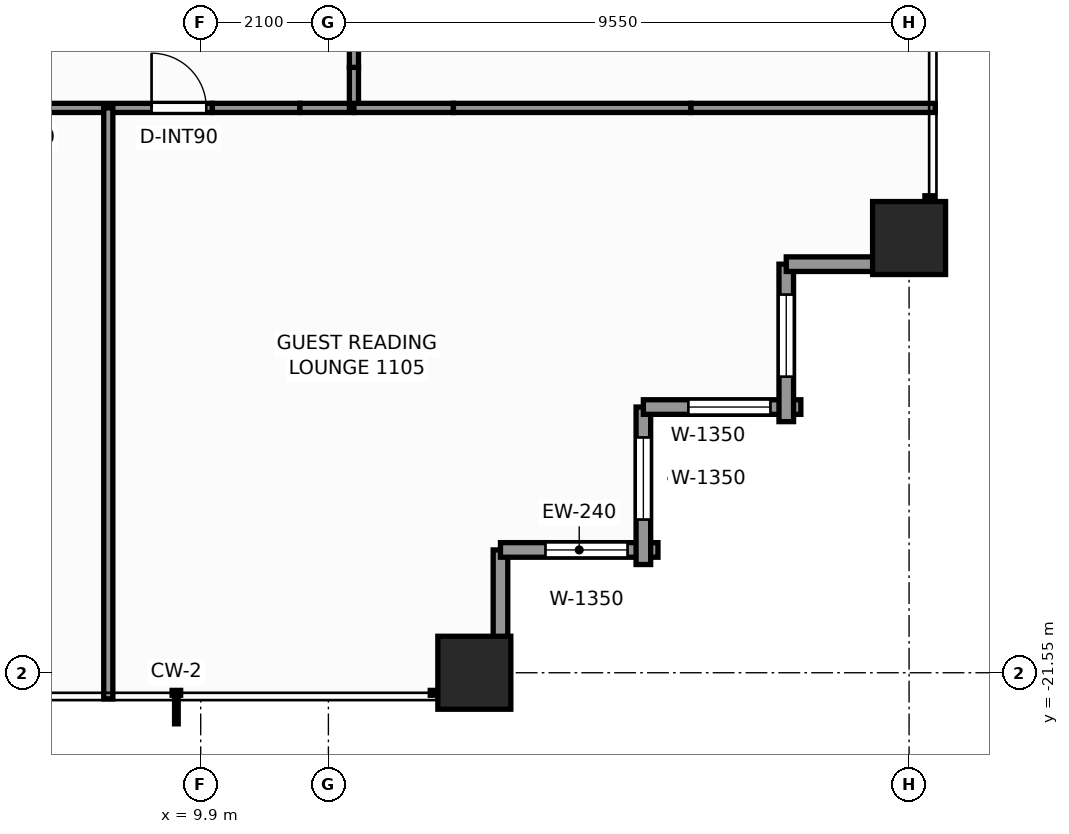
"""IFC4 building model, lengths in metres.
Left out: names, types, materials, properties, quantities, classifications, styles, units other than length and angle.
Written with IfcOpenShell. Run it as: python <this file> out.ifc"""

import sys

from ifc_helpers import new_model, si_unit, direction, frame, frame_2d, origin, origin_2d, place, context, subcontext, project, spatial, rectangle, extrude, element, fill, save


model = new_model("IFC4")
c1 = context("Model", 3, precision=1e-05, world=origin(), true_north=direction((0.0, 1.0)))
c2 = subcontext(c1, "Body", "Model", "MODEL_VIEW")
j1 = project(units=[si_unit("LENGTHUNIT", "METRE"), si_unit("PLANEANGLEUNIT", "RADIAN")], contexts=[c1])
p1 = place(None, origin())
s1 = spatial("IfcSite", under=j1, at=p1, CompositionType="ELEMENT")
p2 = place(p1, origin())
s2 = spatial("IfcBuilding", under=s1, at=p2, CompositionType="ELEMENT")
p3 = place(p2, frame((0.0, 0.0, 40.3)))
s3 = spatial("IfcBuildingStorey", under=s2, at=p3, CompositionType="ELEMENT", Elevation=40.3)
for number, where, z_axis, x_axis in (
    (1, (14.4, -21.55, 0.0), (0.0, 0.0, 1.0), (1.0, 0.0, 0.0)),
    (2, (21.55, -14.4, 0.0), (0.0, 0.0, 1.0), (1.0, 0.0, 0.0)),
):
    element("IfcColumn", number, at=place(p3, frame(where, z_axis=z_axis, x_axis=x_axis)), inside=s3, PredefinedType="COLUMN", context=c2, shape_type="SweptSolid", body=[
        extrude(rectangle(XDim=1.2, YDim=1.2, at=origin_2d()), origin(), (0.0, 0.0, 1.0), 3.3),
    ])
p4 = place(p3, frame((14.83, -19.53, 0.0), z_axis=(0.0, 0.0, 1.0), x_axis=(0.0, -1.0, 0.0)))
e3 = element("IfcWall", 3, at=p4, inside=s3, PredefinedType="STANDARD", context=c2, shape_type="SweptSolid", body=[
    extrude(rectangle(XDim=2.59, YDim=0.24, at=frame_2d((1.295, 0.0))), origin(), (0.0, 0.0, 1.0), 1.255),
])
p5 = place(p3, frame((17.42, -19.53, 0.0), z_axis=(0.0, 0.0, 1.0), x_axis=(-1.0, 0.0, 0.0)))
e4 = element("IfcWall", 4, at=p5, inside=s3, PredefinedType="STANDARD", context=c2, shape_type="SweptSolid", body=[
    extrude(rectangle(XDim=2.59, YDim=0.24, at=frame_2d((1.295, 0.0))), origin(), (0.0, 0.0, 1.0), 2.439),
])
p6 = place(p5, frame((0.5, 0.0, 0.65)))
e5 = element("IfcOpeningElement", 5, at=p6, cuts=e4, PredefinedType="OPENING", context=c2, shape_type="SweptSolid", body=[
    extrude(rectangle(XDim=1.35, YDim=1.55, at=frame_2d((0.675, 0.775))), frame((0.0, 0.13, 0.0), z_axis=(0.0, -1.0, 0.0), x_axis=(1.0, 0.0, 0.0)), (0.0, 0.0, 1.0), 0.26),
])
p7 = place(p3, frame((17.18, -17.18, 0.0), z_axis=(0.0, 0.0, 1.0), x_axis=(0.0, -1.0, 0.0)))
e6 = element("IfcWall", 6, at=p7, inside=s3, PredefinedType="STANDARD", context=c2, shape_type="SweptSolid", body=[
    extrude(rectangle(XDim=2.59, YDim=0.24, at=frame_2d((1.295, 0.0))), origin(), (0.0, 0.0, 1.0), 2.439),
])
p8 = place(p7, frame((0.5, 0.0, 0.65)))
e7 = element("IfcOpeningElement", 7, at=p8, cuts=e6, PredefinedType="OPENING", context=c2, shape_type="SweptSolid", body=[
    extrude(rectangle(XDim=1.35, YDim=1.55, at=frame_2d((0.675, 0.775))), frame((0.0, 0.13, 0.0), z_axis=(0.0, -1.0, 0.0), x_axis=(1.0, 0.0, 0.0)), (0.0, 0.0, 1.0), 0.26),
])
p9 = place(p3, frame((19.77, -17.18, 0.0), z_axis=(0.0, 0.0, 1.0), x_axis=(-1.0, 0.0, 0.0)))
e8 = element("IfcWall", 8, at=p9, inside=s3, PredefinedType="STANDARD", context=c2, shape_type="SweptSolid", body=[
    extrude(rectangle(XDim=2.59, YDim=0.24, at=frame_2d((1.295, 0.0))), origin(), (0.0, 0.0, 1.0), 2.439),
])
p10 = place(p9, frame((0.5, 0.0, 0.65)))
e9 = element("IfcOpeningElement", 9, at=p10, cuts=e8, PredefinedType="OPENING", context=c2, shape_type="SweptSolid", body=[
    extrude(rectangle(XDim=1.35, YDim=1.55, at=frame_2d((0.675, 0.775))), frame((0.0, 0.13, 0.0), z_axis=(0.0, -1.0, 0.0), x_axis=(1.0, 0.0, 0.0)), (0.0, 0.0, 1.0), 0.26),
])
p11 = place(p3, frame((19.53, -14.83, 0.0), z_axis=(0.0, 0.0, 1.0), x_axis=(0.0, -1.0, 0.0)))
e10 = element("IfcWall", 10, at=p11, inside=s3, PredefinedType="STANDARD", context=c2, shape_type="SweptSolid", body=[
    extrude(rectangle(XDim=2.59, YDim=0.24, at=frame_2d((1.295, 0.0))), origin(), (0.0, 0.0, 1.0), 2.439),
])
p12 = place(p11, frame((0.5, 0.0, 0.65)))
e11 = element("IfcOpeningElement", 11, at=p12, cuts=e10, PredefinedType="OPENING", context=c2, shape_type="SweptSolid", body=[
    extrude(rectangle(XDim=1.35, YDim=1.55, at=frame_2d((0.675, 0.775))), frame((0.0, 0.13, 0.0), z_axis=(0.0, -1.0, 0.0), x_axis=(1.0, 0.0, 0.0)), (0.0, 0.0, 1.0), 0.26),
])
p13 = place(p3, frame((22.12, -14.83, 0.0), z_axis=(0.0, 0.0, 1.0), x_axis=(-1.0, 0.0, 0.0)))
e12 = element("IfcWall", 12, at=p13, inside=s3, PredefinedType="STANDARD", context=c2, shape_type="SweptSolid", body=[
    extrude(rectangle(XDim=2.59, YDim=0.24, at=frame_2d((1.295, 0.0))), origin(), (0.0, 0.0, 1.0), 1.255),
])
p14 = place(p3, frame((5.242, -12.26, 0.0), z_axis=(0.0, 0.0, 1.0), x_axis=(1.0, 0.0, 0.0)))
e13 = element("IfcWall", 13, at=p14, inside=s3, PredefinedType="PARTITIONING", context=c2, shape_type="SweptSolid", body=[
    extrude(rectangle(XDim=4.85, YDim=0.15, at=frame_2d((2.425, 0.0))), origin(), (0.0, 0.0, 1.0), 3.06),
])
p15 = place(p14, frame((1.165, 0.0, 0.0)))
e14 = element("IfcOpeningElement", 14, at=p15, cuts=e13, PredefinedType="OPENING", context=c2, shape_type="SweptSolid", body=[
    extrude(rectangle(XDim=0.9, YDim=2.06, at=frame_2d((0.45, 1.03))), frame((0.0, 0.085, 0.0), z_axis=(0.0, -1.0, 0.0), x_axis=(1.0, 0.0, 0.0)), (0.0, 0.0, 1.0), 0.17),
])
p16 = place(p14, frame((3.85, 0.0, 0.0)))
e15 = element("IfcOpeningElement", 15, at=p16, cuts=e13, PredefinedType="OPENING", context=c2, shape_type="SweptSolid", body=[
    extrude(rectangle(XDim=0.9, YDim=2.06, at=frame_2d((0.45, 1.03))), frame((0.0, 0.085, 0.0), z_axis=(0.0, -1.0, 0.0), x_axis=(1.0, 0.0, 0.0)), (0.0, 0.0, 1.0), 0.17),
])
p17 = place(p3, frame((10.092, -12.26, 0.0), z_axis=(0.0, 0.0, 1.0), x_axis=(1.0, 0.0, 0.0)))
e16 = element("IfcWall", 16, at=p17, inside=s3, PredefinedType="PARTITIONING", context=c2, shape_type="SweptSolid", body=[
    extrude(rectangle(XDim=1.439, YDim=0.15, at=frame_2d((0.72, 0.0))), origin(), (0.0, 0.0, 1.0), 1.245),
])
p18 = place(p3, frame((11.531, -12.26, 0.0), z_axis=(0.0, 0.0, 1.0), x_axis=(1.0, 0.0, 0.0)))
e17 = element("IfcWall", 17, at=p18, inside=s3, PredefinedType="PARTITIONING", context=c2, shape_type="SweptSolid", body=[
    extrude(rectangle(XDim=0.889, YDim=0.15, at=frame_2d((0.444, 0.0))), origin(), (0.0, 0.0, 1.0), 3.06),
])
p19 = place(p3, frame((12.42, -12.26, 0.0), z_axis=(0.0, 0.0, 1.0), x_axis=(0.0, 1.0, 0.0)))
e18 = element("IfcWall", 18, at=p19, inside=s3, PredefinedType="PARTITIONING", context=c2, shape_type="SweptSolid", body=[
    extrude(rectangle(XDim=0.667, YDim=0.15, at=frame_2d((0.333, 0.0))), origin(), (0.0, 0.0, 1.0), 3.06),
])
p20 = place(p3, frame((12.42, -11.593, 0.0), z_axis=(0.0, 0.0, 1.0), x_axis=(0.0, 1.0, 0.0)))
e19 = element("IfcWall", 19, at=p20, inside=s3, PredefinedType="PARTITIONING", context=c2, shape_type="SweptSolid", body=[
    extrude(rectangle(XDim=1.439, YDim=0.15, at=frame_2d((0.72, 0.0))), origin(), (0.0, 0.0, 1.0), 1.245),
])
p21 = place(p3, frame((12.42, -12.26, 0.0), z_axis=(0.0, 0.0, 1.0), x_axis=(1.0, 0.0, 0.0)))
e20 = element("IfcWall", 20, at=p21, inside=s3, PredefinedType="PARTITIONING", context=c2, shape_type="SweptSolid", body=[
    extrude(rectangle(XDim=1.636, YDim=0.15, at=frame_2d((0.818, 0.0))), origin(), (0.0, 0.0, 1.0), 3.06),
])
p22 = place(p3, frame((14.056, -12.26, 0.0), z_axis=(0.0, 0.0, 1.0), x_axis=(1.0, 0.0, 0.0)))
e21 = element("IfcWall", 21, at=p22, inside=s3, PredefinedType="PARTITIONING", context=c2, shape_type="SweptSolid", body=[
    extrude(rectangle(XDim=3.907, YDim=0.15, at=frame_2d((1.954, 0.0))), origin(), (0.0, 0.0, 1.0), 1.245),
])
p23 = place(p3, frame((17.963, -12.26, 0.0), z_axis=(0.0, 0.0, 1.0), x_axis=(1.0, 0.0, 0.0)))
e22 = element("IfcWall", 22, at=p23, inside=s3, PredefinedType="PARTITIONING", context=c2, shape_type="SweptSolid", body=[
    extrude(rectangle(XDim=4.017, YDim=0.15, at=frame_2d((2.008, 0.0))), origin(), (0.0, 0.0, 1.0), 2.429),
])
p24 = place(p3, frame((8.38, -21.98, 0.0), z_axis=(0.0, 0.0, 1.0), x_axis=(0.0, 1.0, 0.0)))
e23 = element("IfcWall", 23, at=p24, inside=s3, PredefinedType="PARTITIONING", context=c2, shape_type="SweptSolid", body=[
    extrude(rectangle(XDim=9.72, YDim=0.15, at=frame_2d((4.86, 0.0))), origin(), (0.0, 0.0, 1.0), 2.429),
])
p25 = place(p6, origin())
e24 = element("IfcWindow", 24, at=p25, inside=s3, PartitioningType="SINGLE_PANEL", PredefinedType="WINDOW", context=c2, shape_type="SweptSolid", body=[
    extrude(rectangle(XDim=1.35, YDim=1.55, at=frame_2d((0.675, 0.775))), frame((0.0, 0.03, 0.0), z_axis=(0.0, -1.0, 0.0), x_axis=(1.0, 0.0, 0.0)), (0.0, 0.0, 1.0), 0.06),
])
fill(e5, e24)
p26 = place(p8, origin())
e25 = element("IfcWindow", 25, at=p26, inside=s3, PartitioningType="SINGLE_PANEL", PredefinedType="WINDOW", context=c2, shape_type="SweptSolid", body=[
    extrude(rectangle(XDim=1.35, YDim=1.55, at=frame_2d((0.675, 0.775))), frame((0.0, 0.03, 0.0), z_axis=(0.0, -1.0, 0.0), x_axis=(1.0, 0.0, 0.0)), (0.0, 0.0, 1.0), 0.06),
])
fill(e7, e25)
p27 = place(p10, origin())
e26 = element("IfcWindow", 26, at=p27, inside=s3, PartitioningType="SINGLE_PANEL", PredefinedType="WINDOW", context=c2, shape_type="SweptSolid", body=[
    extrude(rectangle(XDim=1.35, YDim=1.55, at=frame_2d((0.675, 0.775))), frame((0.0, 0.03, 0.0), z_axis=(0.0, -1.0, 0.0), x_axis=(1.0, 0.0, 0.0)), (0.0, 0.0, 1.0), 0.06),
])
fill(e9, e26)
p28 = place(p12, origin())
e27 = element("IfcWindow", 27, at=p28, inside=s3, PartitioningType="SINGLE_PANEL", PredefinedType="WINDOW", context=c2, shape_type="SweptSolid", body=[
    extrude(rectangle(XDim=1.35, YDim=1.55, at=frame_2d((0.675, 0.775))), frame((0.0, 0.03, 0.0), z_axis=(0.0, -1.0, 0.0), x_axis=(1.0, 0.0, 0.0)), (0.0, 0.0, 1.0), 0.06),
])
fill(e11, e27)
p29 = place(p16, origin())
e28 = element("IfcDoor", 28, at=p29, inside=s3, OperationType="SINGLE_SWING_LEFT", PredefinedType="DOOR", context=c2, shape_type="SweptSolid", body=[
    extrude(rectangle(XDim=0.9, YDim=2.06, at=frame_2d((0.45, 1.03))), frame((0.0, 0.025, 0.0), z_axis=(0.0, -1.0, 0.0), x_axis=(1.0, 0.0, 0.0)), (0.0, 0.0, 1.0), 0.05),
])
fill(e15, e28)
save(model, sys.argv[1])
